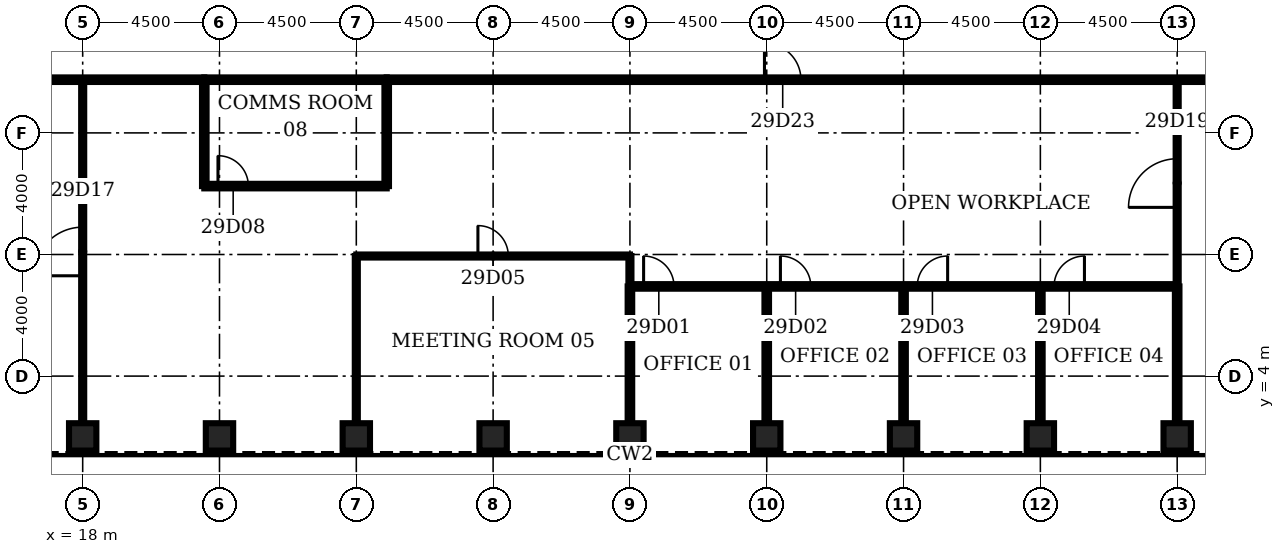
"""IFC4 building model, lengths in metres.
Left out: names, types, materials, properties, quantities, classifications, styles, units other than length and angle.
Written with IfcOpenShell. Run it as: python <this file> out.ifc"""

import sys

from ifc_helpers import new_model, si_unit, direction, frame, frame_2d, origin, origin_2d, place, context, subcontext, project, spatial, rectangle, hollow_rectangle, extrude, element, fill, save


model = new_model("IFC4")
c1 = context("Model", 3, precision=1e-05, world=origin(), true_north=direction((0.0, 1.0)))
c2 = subcontext(c1, "Body", "Model", "MODEL_VIEW")
j1 = project(units=[si_unit("LENGTHUNIT", "METRE"), si_unit("PLANEANGLEUNIT", "RADIAN")], contexts=[c1])
p1 = place(None, origin())
s1 = spatial("IfcSite", under=j1, at=p1, CompositionType="ELEMENT")
p2 = place(p1, origin())
s2 = spatial("IfcBuilding", under=s1, at=p2, CompositionType="ELEMENT")
p3 = place(p2, frame((0.0, 0.0, 134.1)))
s3 = spatial("IfcBuildingStorey", under=s2, at=p3, CompositionType="ELEMENT", Elevation=134.1)
for number, where, z_axis, x_axis in (
    (1, (18.0, 2.0, 0.0), (0.0, 0.0, 1.0), (0.0, 1.0, 0.0)),
    (2, (22.5, 2.0, 0.0), (0.0, 0.0, 1.0), (0.0, 1.0, 0.0)),
    (3, (27.0, 2.0, 0.0), (0.0, 0.0, 1.0), (0.0, 1.0, 0.0)),
    (4, (31.5, 2.0, 0.0), (0.0, 0.0, 1.0), (0.0, 1.0, 0.0)),
    (5, (36.0, 2.0, 0.0), (0.0, 0.0, 1.0), (0.0, 1.0, 0.0)),
    (6, (40.5, 2.0, 0.0), (0.0, 0.0, 1.0), (0.0, 1.0, 0.0)),
    (7, (45.0, 2.0, 0.0), (0.0, 0.0, 1.0), (0.0, 1.0, 0.0)),
    (8, (49.5, 2.0, 0.0), (0.0, 0.0, 1.0), (0.0, 1.0, 0.0)),
    (9, (54.0, 2.0, 0.0), (0.0, 0.0, 1.0), (0.0, 1.0, 0.0)),
):
    element("IfcColumn", number, at=place(p3, frame(where, z_axis=z_axis, x_axis=x_axis)), inside=s3, PredefinedType="COLUMN", context=c2, shape_type="SweptSolid", body=[
        extrude(hollow_rectangle(XDim=0.9, YDim=0.9, WallThickness=0.1, at=origin_2d()), origin(), (0.0, 0.0, 1.0), 4.2),
    ])
p4 = place(p3, frame((36.0, 6.95, 0.0), z_axis=(0.0, 0.0, 1.0), x_axis=(1.0, 0.0, 0.0)))
e10 = element("IfcWall", 10, at=p4, inside=s3, PredefinedType="PARTITIONING", context=c2, shape_type="SweptSolid", body=[
    extrude(rectangle(XDim=18.0, YDim=0.15, at=frame_2d((9.0, 0.0))), origin(), (0.0, 0.0, 1.0), 3.0),
])
p5 = place(p4, frame((0.45, 0.0, 0.0)))
e11 = element("IfcOpeningElement", 11, at=p5, cuts=e10, PredefinedType="OPENING", context=c2, shape_type="SweptSolid", body=[
    extrude(rectangle(XDim=1.0, YDim=2.1, at=frame_2d((0.5, 1.05))), frame((0.0, 0.085, 0.0), z_axis=(0.0, -1.0, 0.0), x_axis=(1.0, 0.0, 0.0)), (0.0, 0.0, 1.0), 0.17),
])
p6 = place(p4, frame((4.95, 0.0, 0.0)))
e12 = element("IfcOpeningElement", 12, at=p6, cuts=e10, PredefinedType="OPENING", context=c2, shape_type="SweptSolid", body=[
    extrude(rectangle(XDim=1.0, YDim=2.1, at=frame_2d((0.5, 1.05))), frame((0.0, 0.085, 0.0), z_axis=(0.0, -1.0, 0.0), x_axis=(1.0, 0.0, 0.0)), (0.0, 0.0, 1.0), 0.17),
])
p7 = place(p4, frame((9.45, 0.0, 0.0)))
e13 = element("IfcOpeningElement", 13, at=p7, cuts=e10, PredefinedType="OPENING", context=c2, shape_type="SweptSolid", body=[
    extrude(rectangle(XDim=1.0, YDim=2.1, at=frame_2d((0.5, 1.05))), frame((0.0, 0.085, 0.0), z_axis=(0.0, -1.0, 0.0), x_axis=(1.0, 0.0, 0.0)), (0.0, 0.0, 1.0), 0.17),
])
p8 = place(p4, frame((13.95, 0.0, 0.0)))
e14 = element("IfcOpeningElement", 14, at=p8, cuts=e10, PredefinedType="OPENING", context=c2, shape_type="SweptSolid", body=[
    extrude(rectangle(XDim=1.0, YDim=2.1, at=frame_2d((0.5, 1.05))), frame((0.0, 0.085, 0.0), z_axis=(0.0, -1.0, 0.0), x_axis=(1.0, 0.0, 0.0)), (0.0, 0.0, 1.0), 0.17),
])
p9 = place(p3, frame((27.0, 7.95, 0.0), z_axis=(0.0, 0.0, 1.0), x_axis=(1.0, 0.0, 0.0)))
e15 = element("IfcWall", 15, at=p9, inside=s3, PredefinedType="PARTITIONING", context=c2, shape_type="SweptSolid", body=[
    extrude(rectangle(XDim=9.0, YDim=0.1, at=frame_2d((4.5, 0.0))), origin(), (0.0, 0.0, 1.0), 3.0),
])
p10 = place(p9, frame((4.0, 0.0, 0.0)))
e16 = element("IfcOpeningElement", 16, at=p10, cuts=e15, PredefinedType="OPENING", context=c2, shape_type="SweptSolid", body=[
    extrude(rectangle(XDim=1.0, YDim=2.1, at=frame_2d((0.5, 1.05))), frame((0.0, 0.06, 0.0), z_axis=(0.0, -1.0, 0.0), x_axis=(1.0, 0.0, 0.0)), (0.0, 0.0, 1.0), 0.12),
])
p11 = place(p3, frame((22.0, 10.25, 0.0), z_axis=(0.0, 0.0, 1.0), x_axis=(1.0, 0.0, 0.0)))
e17 = element("IfcWall", 17, at=p11, inside=s3, PredefinedType="PARTITIONING", context=c2, shape_type="SweptSolid", body=[
    extrude(rectangle(XDim=6.0, YDim=0.15, at=frame_2d((3.0, 0.0))), origin(), (0.0, 0.0, 1.0), 3.0),
])
p12 = place(p11, frame((0.45, 0.0, 0.0)))
e18 = element("IfcOpeningElement", 18, at=p12, cuts=e17, PredefinedType="OPENING", context=c2, shape_type="SweptSolid", body=[
    extrude(rectangle(XDim=1.0, YDim=2.1, at=frame_2d((0.5, 1.05))), frame((0.0, 0.085, 0.0), z_axis=(0.0, -1.0, 0.0), x_axis=(1.0, 0.0, 0.0)), (0.0, 0.0, 1.0), 0.17),
])
p13 = place(p3, frame((15.15, 13.75, 0.0), z_axis=(0.0, 0.0, 1.0), x_axis=(1.0, 0.0, 0.0)))
e19 = element("IfcWall", 19, at=p13, inside=s3, PredefinedType="PARTITIONING", context=c2, shape_type="SweptSolid", body=[
    extrude(rectangle(XDim=6.85, YDim=0.15, at=frame_2d((3.425, 0.0))), origin(), (0.0, 0.0, 1.0), 3.0),
])
p14 = place(p3, frame((22.0, 13.75, 0.0), z_axis=(0.0, 0.0, 1.0), x_axis=(1.0, 0.0, 0.0)))
e20 = element("IfcWall", 20, at=p14, inside=s3, PredefinedType="PARTITIONING", context=c2, shape_type="SweptSolid", body=[
    extrude(rectangle(XDim=6.0, YDim=0.15, at=frame_2d((3.0, 0.0))), origin(), (0.0, 0.0, 1.0), 3.0),
])
p15 = place(p3, frame((28.0, 13.75, 0.0), z_axis=(0.0, 0.0, 1.0), x_axis=(1.0, 0.0, 0.0)))
e21 = element("IfcWall", 21, at=p15, inside=s3, PredefinedType="PARTITIONING", context=c2, shape_type="SweptSolid", body=[
    extrude(rectangle(XDim=28.85, YDim=0.15, at=frame_2d((14.425, 0.0))), origin(), (0.0, 0.0, 1.0), 3.0),
])
p16 = place(p15, frame((12.425, 0.0, 0.0)))
e22 = element("IfcOpeningElement", 22, at=p16, cuts=e21, PredefinedType="OPENING", context=c2, shape_type="SweptSolid", body=[
    extrude(rectangle(XDim=1.2, YDim=2.1, at=frame_2d((0.6, 1.05))), frame((0.0, 0.085, 0.0), z_axis=(0.0, -1.0, 0.0), x_axis=(1.0, 0.0, 0.0)), (0.0, 0.0, 1.0), 0.17),
])
p17 = place(p3, frame((18.0, 2.45, 0.0), z_axis=(0.0, 0.0, 1.0), x_axis=(0.0, 1.0, 0.0)))
e23 = element("IfcWall", 23, at=p17, inside=s3, PredefinedType="PARTITIONING", context=c2, shape_type="SweptSolid", body=[
    extrude(rectangle(XDim=11.3, YDim=0.1, at=frame_2d((5.65, 0.0))), origin(), (0.0, 0.0, 1.0), 3.0),
])
p18 = place(p17, frame((4.85, 0.0, 0.0)))
e24 = element("IfcOpeningElement", 24, at=p18, cuts=e23, PredefinedType="OPENING", context=c2, shape_type="SweptSolid", body=[
    extrude(rectangle(XDim=1.6, YDim=2.1, at=frame_2d((0.8, 1.05))), frame((0.0, 0.06, 0.0), z_axis=(0.0, -1.0, 0.0), x_axis=(1.0, 0.0, 0.0)), (0.0, 0.0, 1.0), 0.12),
])
p19 = place(p3, frame((22.0, 10.25, 0.0), z_axis=(0.0, 0.0, 1.0), x_axis=(0.0, 1.0, 0.0)))
e25 = element("IfcWall", 25, at=p19, inside=s3, PredefinedType="PARTITIONING", context=c2, shape_type="SweptSolid", body=[
    extrude(rectangle(XDim=3.5, YDim=0.15, at=frame_2d((1.75, 0.0))), origin(), (0.0, 0.0, 1.0), 3.0),
])
p20 = place(p3, frame((27.0, 2.45, 0.0), z_axis=(0.0, 0.0, 1.0), x_axis=(0.0, 1.0, 0.0)))
e26 = element("IfcWall", 26, at=p20, inside=s3, PredefinedType="PARTITIONING", context=c2, shape_type="SweptSolid", body=[
    extrude(rectangle(XDim=5.5, YDim=0.1, at=frame_2d((2.75, 0.0))), origin(), (0.0, 0.0, 1.0), 3.0),
])
p21 = place(p3, frame((28.0, 10.25, 0.0), z_axis=(0.0, 0.0, 1.0), x_axis=(0.0, 1.0, 0.0)))
e27 = element("IfcWall", 27, at=p21, inside=s3, PredefinedType="PARTITIONING", context=c2, shape_type="SweptSolid", body=[
    extrude(rectangle(XDim=3.5, YDim=0.15, at=frame_2d((1.75, 0.0))), origin(), (0.0, 0.0, 1.0), 3.0),
])
p22 = place(p3, frame((36.0, 2.45, 0.0), z_axis=(0.0, 0.0, 1.0), x_axis=(0.0, 1.0, 0.0)))
e28 = element("IfcWall", 28, at=p22, inside=s3, PredefinedType="PARTITIONING", context=c2, shape_type="SweptSolid", body=[
    extrude(rectangle(XDim=4.5, YDim=0.15, at=frame_2d((2.25, 0.0))), origin(), (0.0, 0.0, 1.0), 3.0),
])
p23 = place(p3, frame((36.0, 6.95, 0.0), z_axis=(0.0, 0.0, 1.0), x_axis=(0.0, 1.0, 0.0)))
e29 = element("IfcWall", 29, at=p23, inside=s3, PredefinedType="PARTITIONING", context=c2, shape_type="SweptSolid", body=[
    extrude(rectangle(XDim=1.0, YDim=0.1, at=frame_2d((0.5, 0.0))), origin(), (0.0, 0.0, 1.0), 3.0),
])
for number, where, z_axis, x_axis in (
    (30, (40.5, 2.45, 0.0), (0.0, 0.0, 1.0), (0.0, 1.0, 0.0)),
    (31, (45.0, 2.45, 0.0), (0.0, 0.0, 1.0), (0.0, 1.0, 0.0)),
    (32, (49.5, 2.45, 0.0), (0.0, 0.0, 1.0), (0.0, 1.0, 0.0)),
    (33, (54.0, 2.45, 0.0), (0.0, 0.0, 1.0), (0.0, 1.0, 0.0)),
):
    element("IfcWall", number, at=place(p3, frame(where, z_axis=z_axis, x_axis=x_axis)), inside=s3, PredefinedType="PARTITIONING", context=c2, shape_type="SweptSolid", body=[
        extrude(rectangle(XDim=4.5, YDim=0.15, at=frame_2d((2.25, 0.0))), origin(), (0.0, 0.0, 1.0), 3.0),
    ])
p24 = place(p3, frame((54.0, 6.95, 0.0), z_axis=(0.0, 0.0, 1.0), x_axis=(0.0, 1.0, 0.0)))
e34 = element("IfcWall", 34, at=p24, inside=s3, PredefinedType="PARTITIONING", context=c2, shape_type="SweptSolid", body=[
    extrude(rectangle(XDim=6.8, YDim=0.1, at=frame_2d((3.4, 0.0))), origin(), (0.0, 0.0, 1.0), 3.0),
])
p25 = place(p24, frame((2.6, 0.0, 0.0)))
e35 = element("IfcOpeningElement", 35, at=p25, cuts=e34, PredefinedType="OPENING", context=c2, shape_type="SweptSolid", body=[
    extrude(rectangle(XDim=1.6, YDim=2.1, at=frame_2d((0.8, 1.05))), frame((0.0, 0.06, 0.0), z_axis=(0.0, -1.0, 0.0), x_axis=(1.0, 0.0, 0.0)), (0.0, 0.0, 1.0), 0.12),
])
p26 = place(p5, origin())
e36 = element("IfcDoor", 36, at=p26, inside=s3, OperationType="SINGLE_SWING_LEFT", PredefinedType="DOOR", context=c2, shape_type="SweptSolid", body=[
    extrude(rectangle(XDim=1.0, YDim=2.1, at=frame_2d((0.5, 1.05))), frame((0.0, 0.025, 0.0), z_axis=(0.0, -1.0, 0.0), x_axis=(1.0, 0.0, 0.0)), (0.0, 0.0, 1.0), 0.05),
])
fill(e11, e36)
p27 = place(p6, origin())
e37 = element("IfcDoor", 37, at=p27, inside=s3, OperationType="SINGLE_SWING_LEFT", PredefinedType="DOOR", context=c2, shape_type="SweptSolid", body=[
    extrude(rectangle(XDim=1.0, YDim=2.1, at=frame_2d((0.5, 1.05))), frame((0.0, 0.025, 0.0), z_axis=(0.0, -1.0, 0.0), x_axis=(1.0, 0.0, 0.0)), (0.0, 0.0, 1.0), 0.05),
])
fill(e12, e37)
p28 = place(p7, origin())
e38 = element("IfcDoor", 38, at=p28, inside=s3, OperationType="SINGLE_SWING_RIGHT", PredefinedType="DOOR", context=c2, shape_type="SweptSolid", body=[
    extrude(rectangle(XDim=1.0, YDim=2.1, at=frame_2d((0.5, 1.05))), frame((0.0, 0.025, 0.0), z_axis=(0.0, -1.0, 0.0), x_axis=(1.0, 0.0, 0.0)), (0.0, 0.0, 1.0), 0.05),
])
fill(e13, e38)
p29 = place(p8, origin())
e39 = element("IfcDoor", 39, at=p29, inside=s3, OperationType="SINGLE_SWING_RIGHT", PredefinedType="DOOR", context=c2, shape_type="SweptSolid", body=[
    extrude(rectangle(XDim=1.0, YDim=2.1, at=frame_2d((0.5, 1.05))), frame((0.0, 0.025, 0.0), z_axis=(0.0, -1.0, 0.0), x_axis=(1.0, 0.0, 0.0)), (0.0, 0.0, 1.0), 0.05),
])
fill(e14, e39)
p30 = place(p10, origin())
e40 = element("IfcDoor", 40, at=p30, inside=s3, OperationType="SINGLE_SWING_LEFT", PredefinedType="DOOR", context=c2, shape_type="SweptSolid", body=[
    extrude(rectangle(XDim=1.0, YDim=2.1, at=frame_2d((0.5, 1.05))), frame((0.0, 0.025, 0.0), z_axis=(0.0, -1.0, 0.0), x_axis=(1.0, 0.0, 0.0)), (0.0, 0.0, 1.0), 0.05),
])
fill(e16, e40)
p31 = place(p12, origin())
e41 = element("IfcDoor", 41, at=p31, inside=s3, OperationType="SINGLE_SWING_LEFT", PredefinedType="DOOR", context=c2, shape_type="SweptSolid", body=[
    extrude(rectangle(XDim=1.0, YDim=2.1, at=frame_2d((0.5, 1.05))), frame((0.0, 0.025, 0.0), z_axis=(0.0, -1.0, 0.0), x_axis=(1.0, 0.0, 0.0)), (0.0, 0.0, 1.0), 0.05),
])
fill(e18, e41)
p32 = place(p18, origin())
e42 = element("IfcDoor", 42, at=p32, inside=s3, OperationType="SINGLE_SWING_LEFT", PredefinedType="DOOR", context=c2, shape_type="SweptSolid", body=[
    extrude(rectangle(XDim=1.6, YDim=2.1, at=frame_2d((0.8, 1.05))), frame((0.0, 0.025, 0.0), z_axis=(0.0, -1.0, 0.0), x_axis=(1.0, 0.0, 0.0)), (0.0, 0.0, 1.0), 0.05),
])
fill(e24, e42)
p33 = place(p25, origin())
e43 = element("IfcDoor", 43, at=p33, inside=s3, OperationType="SINGLE_SWING_LEFT", PredefinedType="DOOR", context=c2, shape_type="SweptSolid", body=[
    extrude(rectangle(XDim=1.6, YDim=2.1, at=frame_2d((0.8, 1.05))), frame((0.0, 0.025, 0.0), z_axis=(0.0, -1.0, 0.0), x_axis=(1.0, 0.0, 0.0)), (0.0, 0.0, 1.0), 0.05),
])
fill(e35, e43)
p34 = place(p16, origin())
e44 = element("IfcDoor", 44, at=p34, inside=s3, OperationType="SINGLE_SWING_LEFT", PredefinedType="DOOR", context=c2, shape_type="SweptSolid", body=[
    extrude(rectangle(XDim=1.2, YDim=2.1, at=frame_2d((0.6, 1.05))), frame((0.0, 0.025, 0.0), z_axis=(0.0, -1.0, 0.0), x_axis=(1.0, 0.0, 0.0)), (0.0, 0.0, 1.0), 0.05),
])
fill(e22, e44)
save(model, sys.argv[1])
